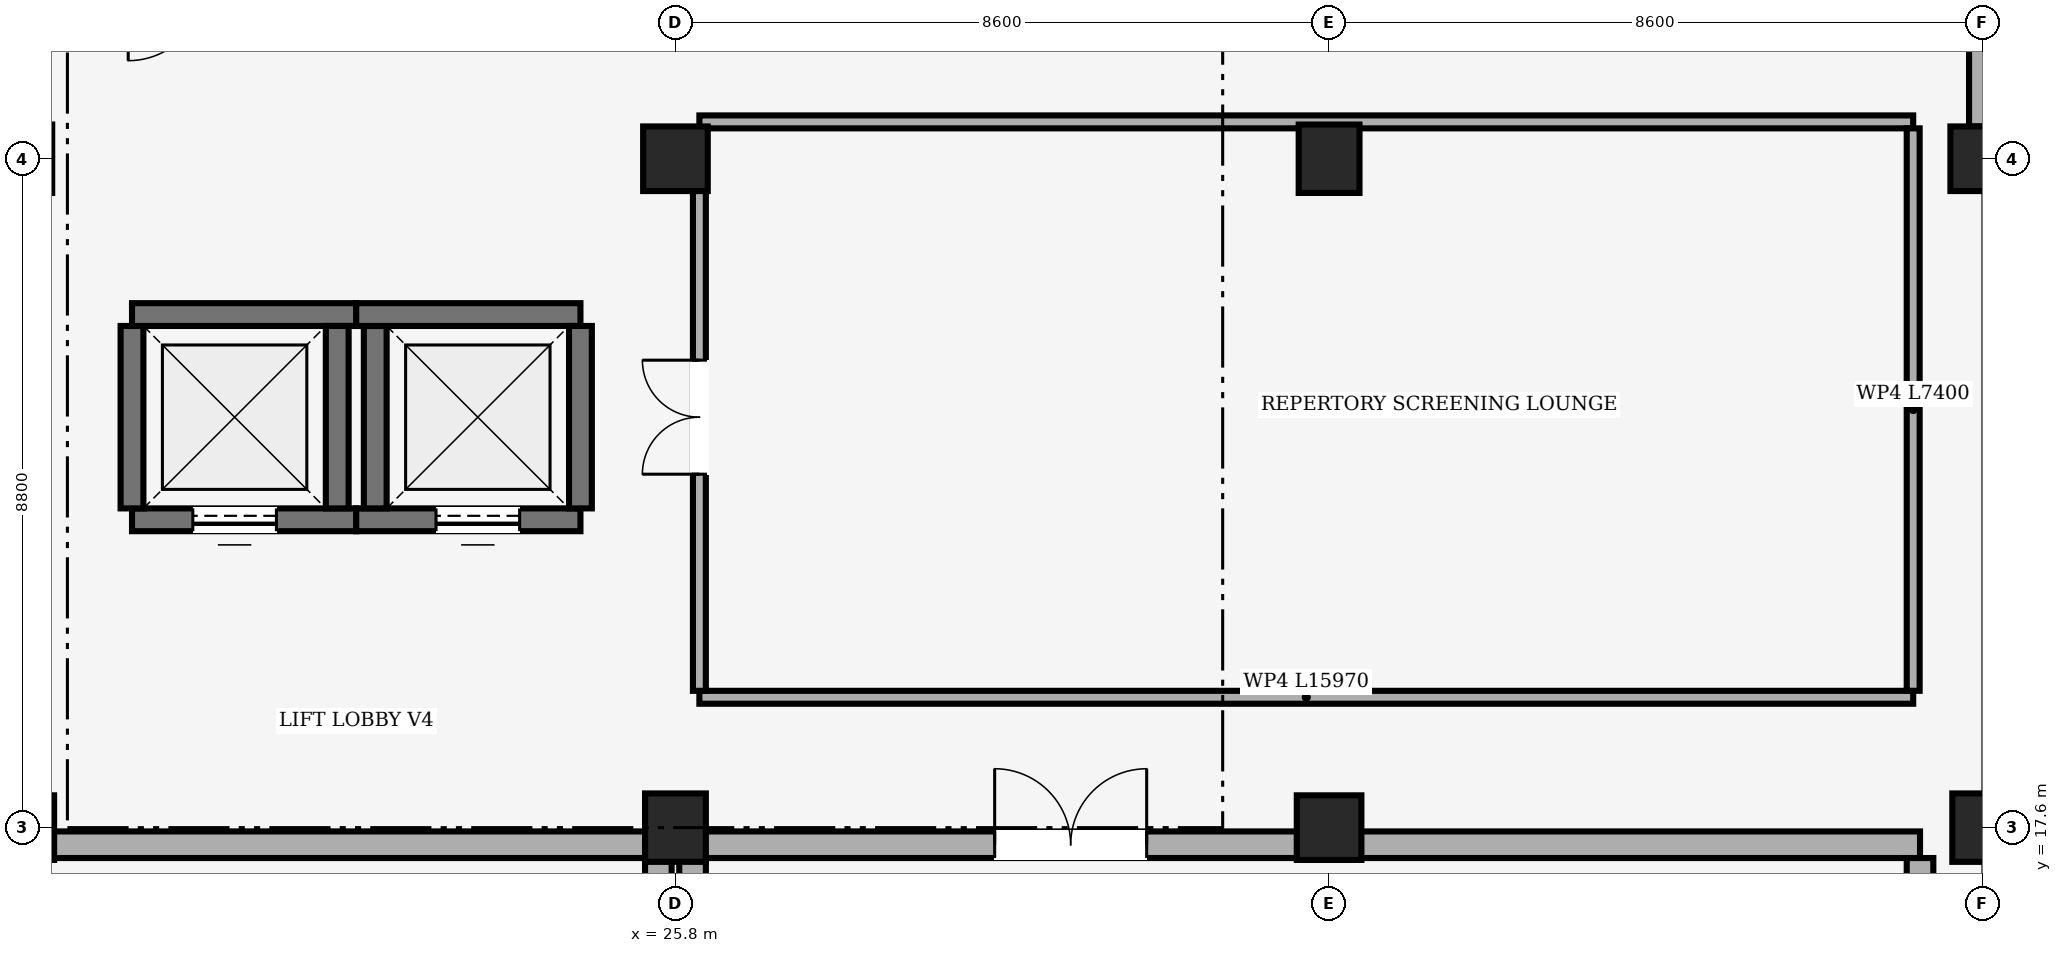
"""IFC4 building model, lengths in metres.
Left out: names, types, materials, properties, quantities, classifications, styles, units other than length and angle.
Written with IfcOpenShell. Run it as: python <this file> out.ifc"""

import sys

from ifc_helpers import new_model, si_unit, direction, frame, frame_2d, origin, origin_2d, place, context, subcontext, project, spatial, rectangle, extrude, element, fill, save


model = new_model("IFC4")
c1 = context("Model", 3, precision=1e-05, world=origin(), true_north=direction((0.0, 1.0)))
c2 = subcontext(c1, "Body", "Model", "MODEL_VIEW")
j1 = project(units=[si_unit("LENGTHUNIT", "METRE"), si_unit("PLANEANGLEUNIT", "RADIAN")], contexts=[c1])
p1 = place(None, origin())
s1 = spatial("IfcSite", under=j1, at=p1, CompositionType="ELEMENT")
p2 = place(p1, origin())
s2 = spatial("IfcBuilding", under=s1, at=p2, CompositionType="ELEMENT")
p3 = place(p2, frame((0.0, 0.0, 4.5)))
s3 = spatial("IfcBuildingStorey", under=s2, at=p3, CompositionType="ELEMENT", Elevation=4.5)
p4 = place(p3, frame((17.2, 17.6, 0.0), z_axis=(0.0, 0.0, 1.0), x_axis=(1.0, 0.0, 0.0)))
e1 = element("IfcColumn", 1, at=p4, inside=s3, PredefinedType="COLUMN", context=c2, shape_type="SweptSolid", body=[
    extrude(rectangle(XDim=0.85, YDim=0.85, at=origin_2d()), origin(), (0.0, 0.0, 1.0), 3.65),
])
p5 = place(p3, frame((25.8, 17.6, 0.0), z_axis=(0.0, 0.0, 1.0), x_axis=(1.0, 0.0, 0.0)))
e2 = element("IfcColumn", 2, at=p5, inside=s3, PredefinedType="COLUMN", context=c2, shape_type="SweptSolid", body=[
    extrude(rectangle(XDim=0.8, YDim=0.9, at=origin_2d()), origin(), (0.0, 0.0, 1.0), 3.65),
])
for number, where, z_axis, x_axis in (
    (3, (25.8, 26.4, 0.0), (0.0, 0.0, 1.0), (1.0, 0.0, 0.0)),
    (4, (34.4, 17.6, 0.0), (0.0, 0.0, 1.0), (1.0, 0.0, 0.0)),
):
    element("IfcColumn", number, at=place(p3, frame(where, z_axis=z_axis, x_axis=x_axis)), inside=s3, PredefinedType="COLUMN", context=c2, shape_type="SweptSolid", body=[
        extrude(rectangle(XDim=0.85, YDim=0.85, at=origin_2d()), origin(), (0.0, 0.0, 1.0), 3.65),
    ])
for number, where, z_axis, x_axis in (
    (5, (34.4, 26.4, 0.0), (0.0, 0.0, 1.0), (1.0, 0.0, 0.0)),
    (6, (43.0, 17.6, 0.0), (0.0, 0.0, 1.0), (1.0, 0.0, 0.0)),
):
    element("IfcColumn", number, at=place(p3, frame(where, z_axis=z_axis, x_axis=x_axis)), inside=s3, PredefinedType="COLUMN", context=c2, shape_type="SweptSolid", body=[
        extrude(rectangle(XDim=0.8, YDim=0.9, at=origin_2d()), origin(), (0.0, 0.0, 1.0), 3.65),
    ])
p6 = place(p3, frame((43.0, 26.4, 0.0), z_axis=(0.0, 0.0, 1.0), x_axis=(1.0, 0.0, 0.0)))
e7 = element("IfcColumn", 7, at=p6, inside=s3, PredefinedType="COLUMN", context=c2, shape_type="SweptSolid", body=[
    extrude(rectangle(XDim=0.85, YDim=0.85, at=origin_2d()), origin(), (0.0, 0.0, 1.0), 3.65),
])
p7 = place(p3, frame((43.0, 26.825, 0.0), z_axis=(0.0, 0.0, 1.0), x_axis=(0.0, 1.0, 0.0)))
e8 = element("IfcWall", 8, at=p7, inside=s3, PredefinedType="SOLIDWALL", context=c2, shape_type="SweptSolid", body=[
    extrude(rectangle(XDim=7.925, YDim=0.36, at=frame_2d((3.962, 0.0))), origin(), (0.0, 0.0, 1.0), 2.935),
])
p8 = place(p3, frame((21.6, 21.65, 0.0), z_axis=(0.0, 0.0, 1.0), x_axis=(-1.0, 0.0, 0.0)))
e9 = element("IfcWall", 9, at=p8, inside=s3, PredefinedType="SHEAR", context=c2, shape_type="SweptSolid", body=[
    extrude(rectangle(XDim=2.95, YDim=0.3, at=frame_2d((1.475, 0.0))), origin(), (0.0, 0.0, 1.0), 3.65),
])
p9 = place(p8, frame((1.05, 0.0, 0.0)))
e10 = element("IfcOpeningElement", 10, at=p9, cuts=e9, PredefinedType="OPENING", context=c2, shape_type="SweptSolid", body=[
    extrude(rectangle(XDim=1.1, YDim=2.1, at=frame_2d((0.55, 1.05))), frame((0.0, 0.15, 0.0), z_axis=(0.0, -1.0, 0.0), x_axis=(1.0, 0.0, 0.0)), (0.0, 0.0, 1.0), 0.3),
])
p10 = place(p3, frame((18.65, 21.8, 0.0), z_axis=(0.0, 0.0, 1.0), x_axis=(0.0, 1.0, 0.0)))
e11 = element("IfcWall", 11, at=p10, inside=s3, PredefinedType="SHEAR", context=c2, shape_type="SweptSolid", body=[
    extrude(rectangle(XDim=2.4, YDim=0.3, at=frame_2d((1.2, 0.0))), origin(), (0.0, 0.0, 1.0), 3.65),
])
p11 = place(p3, frame((18.65, 24.35, 0.0), z_axis=(0.0, 0.0, 1.0), x_axis=(1.0, 0.0, 0.0)))
e12 = element("IfcWall", 12, at=p11, inside=s3, PredefinedType="SHEAR", context=c2, shape_type="SweptSolid", body=[
    extrude(rectangle(XDim=2.95, YDim=0.3, at=frame_2d((1.475, 0.0))), origin(), (0.0, 0.0, 1.0), 3.65),
])
p12 = place(p3, frame((21.35, 24.2, 0.0), z_axis=(0.0, 0.0, 1.0), x_axis=(0.0, -1.0, 0.0)))
e13 = element("IfcWall", 13, at=p12, inside=s3, PredefinedType="SHEAR", context=c2, shape_type="SweptSolid", body=[
    extrude(rectangle(XDim=2.4, YDim=0.3, at=frame_2d((1.2, 0.0))), origin(), (0.0, 0.0, 1.0), 3.65),
])
p13 = place(p3, frame((24.55, 21.65, 0.0), z_axis=(0.0, 0.0, 1.0), x_axis=(-1.0, 0.0, 0.0)))
e14 = element("IfcWall", 14, at=p13, inside=s3, PredefinedType="SHEAR", context=c2, shape_type="SweptSolid", body=[
    extrude(rectangle(XDim=2.95, YDim=0.3, at=frame_2d((1.475, 0.0))), origin(), (0.0, 0.0, 1.0), 3.65),
])
p14 = place(p13, frame((0.8, 0.0, 0.0)))
e15 = element("IfcOpeningElement", 15, at=p14, cuts=e14, PredefinedType="OPENING", context=c2, shape_type="SweptSolid", body=[
    extrude(rectangle(XDim=1.1, YDim=2.1, at=frame_2d((0.55, 1.05))), frame((0.0, 0.15, 0.0), z_axis=(0.0, -1.0, 0.0), x_axis=(1.0, 0.0, 0.0)), (0.0, 0.0, 1.0), 0.3),
])
p15 = place(p3, frame((21.85, 21.8, 0.0), z_axis=(0.0, 0.0, 1.0), x_axis=(0.0, 1.0, 0.0)))
e16 = element("IfcWall", 16, at=p15, inside=s3, PredefinedType="SHEAR", context=c2, shape_type="SweptSolid", body=[
    extrude(rectangle(XDim=2.4, YDim=0.3, at=frame_2d((1.2, 0.0))), origin(), (0.0, 0.0, 1.0), 3.65),
])
p16 = place(p3, frame((21.6, 24.35, 0.0), z_axis=(0.0, 0.0, 1.0), x_axis=(1.0, 0.0, 0.0)))
e17 = element("IfcWall", 17, at=p16, inside=s3, PredefinedType="SHEAR", context=c2, shape_type="SweptSolid", body=[
    extrude(rectangle(XDim=2.95, YDim=0.3, at=frame_2d((1.475, 0.0))), origin(), (0.0, 0.0, 1.0), 3.65),
])
p17 = place(p3, frame((24.55, 24.2, 0.0), z_axis=(0.0, 0.0, 1.0), x_axis=(0.0, -1.0, 0.0)))
e18 = element("IfcWall", 18, at=p17, inside=s3, PredefinedType="SHEAR", context=c2, shape_type="SweptSolid", body=[
    extrude(rectangle(XDim=2.4, YDim=0.3, at=frame_2d((1.2, 0.0))), origin(), (0.0, 0.0, 1.0), 3.65),
])
p18 = place(p3, frame((9.425, 17.375, 0.0), z_axis=(0.0, 0.0, 1.0), x_axis=(1.0, 0.0, 0.0)))
e19 = element("IfcWall", 19, at=p18, inside=s3, PredefinedType="SOLIDWALL", context=c2, shape_type="SweptSolid", body=[
    extrude(rectangle(XDim=16.15, YDim=0.35, at=frame_2d((8.075, 0.0))), origin(), (0.0, 0.0, 1.0), 2.83),
])
p19 = place(p18, frame((3.075, 0.0, 0.0)))
e20 = element("IfcOpeningElement", 20, at=p19, cuts=e19, PredefinedType="OPENING", context=c2, shape_type="SweptSolid", body=[
    extrude(rectangle(XDim=2.0, YDim=2.25, at=frame_2d((1.0, 1.125))), frame((0.0, 0.175, 0.0), z_axis=(0.0, -1.0, 0.0), x_axis=(1.0, 0.0, 0.0)), (0.0, 0.0, 1.0), 0.35),
])
for number, where, z_axis, x_axis in (
    (21, (25.575, 17.2, 0.0), (0.0, 0.0, 1.0), (0.0, -1.0, 0.0)),
    (22, (26.025, 0.8, 0.0), (0.0, 0.0, 1.0), (0.0, 1.0, 0.0)),
):
    element("IfcWall", number, at=place(p3, frame(where, z_axis=z_axis, x_axis=x_axis)), inside=s3, PredefinedType="SOLIDWALL", context=c2, shape_type="SweptSolid", body=[
        extrude(rectangle(XDim=16.4, YDim=0.35, at=frame_2d((8.2, 0.0))), origin(), (0.0, 0.0, 1.0), 2.83),
    ])
p20 = place(p3, frame((26.025, 17.375, 0.0), z_axis=(0.0, 0.0, 1.0), x_axis=(1.0, 0.0, 0.0)))
e23 = element("IfcWall", 23, at=p20, inside=s3, PredefinedType="SOLIDWALL", context=c2, shape_type="SweptSolid", body=[
    extrude(rectangle(XDim=16.15, YDim=0.35, at=frame_2d((8.075, 0.0))), origin(), (0.0, 0.0, 1.0), 2.83),
])
p21 = place(p20, frame((3.975, 0.0, 0.0)))
e24 = element("IfcOpeningElement", 24, at=p21, cuts=e23, PredefinedType="OPENING", context=c2, shape_type="SweptSolid", body=[
    extrude(rectangle(XDim=2.0, YDim=2.25, at=frame_2d((1.0, 1.125))), frame((0.0, 0.175, 0.0), z_axis=(0.0, -1.0, 0.0), x_axis=(1.0, 0.0, 0.0)), (0.0, 0.0, 1.0), 0.35),
])
p22 = place(p3, frame((42.175, 17.2, 0.0), z_axis=(0.0, 0.0, 1.0), x_axis=(0.0, -1.0, 0.0)))
e25 = element("IfcWall", 25, at=p22, inside=s3, PredefinedType="SOLIDWALL", context=c2, shape_type="SweptSolid", body=[
    extrude(rectangle(XDim=16.4, YDim=0.35, at=frame_2d((8.2, 0.0))), origin(), (0.0, 0.0, 1.0), 3.63),
])
p23 = place(p3, frame((42.085, 19.315, 0.0), z_axis=(0.0, 0.0, 1.0), x_axis=(-1.0, 0.0, 0.0)))
e26 = element("IfcWall", 26, at=p23, inside=s3, PredefinedType="PARTITIONING", context=c2, shape_type="SweptSolid", body=[
    extrude(rectangle(XDim=15.97, YDim=0.17, at=frame_2d((7.985, 0.0))), origin(), (0.0, 0.0, 1.0), 3.63),
])
p24 = place(p3, frame((26.115, 19.4, 0.0), z_axis=(0.0, 0.0, 1.0), x_axis=(0.0, 1.0, 0.0)))
e27 = element("IfcWall", 27, at=p24, inside=s3, PredefinedType="PARTITIONING", context=c2, shape_type="SweptSolid", body=[
    extrude(rectangle(XDim=7.4, YDim=0.17, at=frame_2d((3.7, 0.0))), origin(), (0.0, 0.0, 1.0), 2.93),
])
p25 = place(p24, frame((2.85, 0.0, 0.0)))
e28 = element("IfcOpeningElement", 28, at=p25, cuts=e27, PredefinedType="OPENING", context=c2, shape_type="SweptSolid", body=[
    extrude(rectangle(XDim=1.5, YDim=2.2, at=frame_2d((0.75, 1.1))), frame((0.0, 0.085, 0.0), z_axis=(0.0, -1.0, 0.0), x_axis=(1.0, 0.0, 0.0)), (0.0, 0.0, 1.0), 0.17),
])
p26 = place(p3, frame((26.115, 26.885, 0.0), z_axis=(0.0, 0.0, 1.0), x_axis=(1.0, 0.0, 0.0)))
e29 = element("IfcWall", 29, at=p26, inside=s3, PredefinedType="PARTITIONING", context=c2, shape_type="SweptSolid", body=[
    extrude(rectangle(XDim=15.97, YDim=0.17, at=frame_2d((7.985, 0.0))), origin(), (0.0, 0.0, 1.0), 2.83),
])
p27 = place(p3, frame((42.085, 26.8, 0.0), z_axis=(0.0, 0.0, 1.0), x_axis=(0.0, -1.0, 0.0)))
e30 = element("IfcWall", 30, at=p27, inside=s3, PredefinedType="PARTITIONING", context=c2, shape_type="SweptSolid", body=[
    extrude(rectangle(XDim=7.4, YDim=0.17, at=frame_2d((3.7, 0.0))), origin(), (0.0, 0.0, 1.0), 3.63),
])
p28 = place(p9, origin())
e31 = element("IfcDoor", 31, at=p28, inside=s3, OperationType="SLIDING_TO_LEFT", PredefinedType="DOOR", context=c2, shape_type="SweptSolid", body=[
    extrude(rectangle(XDim=1.1, YDim=2.1, at=frame_2d((0.55, 1.05))), frame((0.0, 0.025, 0.0), z_axis=(0.0, -1.0, 0.0), x_axis=(1.0, 0.0, 0.0)), (0.0, 0.0, 1.0), 0.05),
])
fill(e10, e31)
p29 = place(p14, origin())
e32 = element("IfcDoor", 32, at=p29, inside=s3, OperationType="SLIDING_TO_LEFT", PredefinedType="DOOR", context=c2, shape_type="SweptSolid", body=[
    extrude(rectangle(XDim=1.1, YDim=2.1, at=frame_2d((0.55, 1.05))), frame((0.0, 0.025, 0.0), z_axis=(0.0, -1.0, 0.0), x_axis=(1.0, 0.0, 0.0)), (0.0, 0.0, 1.0), 0.05),
])
fill(e15, e32)
p30 = place(p21, origin())
e33 = element("IfcDoor", 33, at=p30, inside=s3, OperationType="DOUBLE_DOOR_SINGLE_SWING", PredefinedType="DOOR", context=c2, shape_type="SweptSolid", body=[
    extrude(rectangle(XDim=2.0, YDim=2.25, at=frame_2d((1.0, 1.125))), frame((0.0, 0.025, 0.0), z_axis=(0.0, -1.0, 0.0), x_axis=(1.0, 0.0, 0.0)), (0.0, 0.0, 1.0), 0.05),
])
fill(e24, e33)
p31 = place(p25, origin())
e34 = element("IfcDoor", 34, at=p31, inside=s3, OperationType="DOUBLE_DOOR_SINGLE_SWING", PredefinedType="DOOR", context=c2, shape_type="SweptSolid", body=[
    extrude(rectangle(XDim=1.5, YDim=2.2, at=frame_2d((0.75, 1.1))), frame((0.0, 0.025, 0.0), z_axis=(0.0, -1.0, 0.0), x_axis=(1.0, 0.0, 0.0)), (0.0, 0.0, 1.0), 0.05),
])
fill(e28, e34)
save(model, sys.argv[1])
